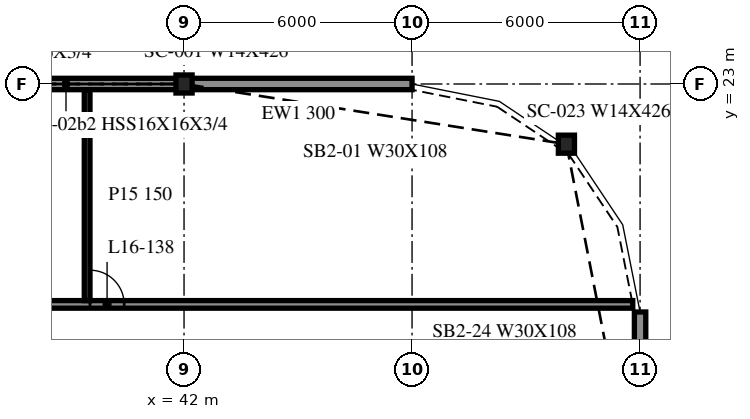
"""IFC4 building model, lengths in metres.
Left out: names, types, materials, properties, quantities, classifications, styles, units other than length and angle.
Written with IfcOpenShell. Run it as: python <this file> out.ifc"""

import sys

from ifc_helpers import new_model, si_unit, direction, frame, frame_2d, origin, origin_2d, place, context, subcontext, project, spatial, rectangle, i_section, extrude, element, fill, save


model = new_model("IFC4")
c1 = context("Model", 3, precision=1e-05, world=origin(), true_north=direction((0.0, 1.0)))
c2 = subcontext(c1, "Body", "Model", "MODEL_VIEW")
j1 = project(units=[si_unit("LENGTHUNIT", "METRE"), si_unit("PLANEANGLEUNIT", "RADIAN")], contexts=[c1])
p1 = place(None, origin())
s1 = spatial("IfcSite", under=j1, at=p1, CompositionType="ELEMENT")
p2 = place(p1, origin())
s2 = spatial("IfcBuilding", under=s1, at=p2, CompositionType="ELEMENT")
p3 = place(p2, frame((0.0, 0.0, 71.8)))
s3 = spatial("IfcBuildingStorey", under=s2, at=p3, CompositionType="ELEMENT", Elevation=71.8)
for number, where, z_axis, x_axis in (
    (1, (52.062, 21.416, -0.34), (0.0, 0.0, 1.0), (1.0, 0.0, 0.0)),
    (2, (42.0, 23.0, -0.34), (0.0, 0.0, 1.0), (1.0, 0.0, 0.0)),
):
    element("IfcColumn", number, at=place(p3, frame(where, z_axis=z_axis, x_axis=x_axis)), inside=s3, PredefinedType="COLUMN", context=c2, shape_type="SweptSolid", body=[
        extrude(i_section(OverallWidth=0.424, OverallDepth=0.475, WebThickness=0.048, FlangeThickness=0.077, at=origin_2d()), origin(), (0.0, 0.0, 1.0), 4.3),
    ])
p4 = place(p3, frame((48.0, 23.0, 0.0), z_axis=(0.0, 0.0, 1.0), x_axis=(-1.0, 0.0, 0.0)))
e3 = element("IfcWall", 3, at=p4, inside=s3, PredefinedType="NOTDEFINED", context=c2, shape_type="SweptSolid", body=[
    extrude(rectangle(XDim=5.976, YDim=0.3, at=frame_2d((2.988, 0.0))), origin(), (0.0, 0.0, 1.0), 3.203),
])
p5 = place(p3, frame((41.976, 23.0, 0.0), z_axis=(0.0, 0.0, 1.0), x_axis=(-1.0, 0.0, 0.0)))
e4 = element("IfcWall", 4, at=p5, inside=s3, PredefinedType="NOTDEFINED", context=c2, shape_type="SweptSolid", body=[
    extrude(rectangle(XDim=11.952, YDim=0.3, at=frame_2d((5.976, 0.0))), origin(), (0.0, 0.0, 1.0), 3.203),
])
p6 = place(p3, frame((54.0, 11.738, 0.0), z_axis=(0.0, 0.0, 1.0), x_axis=(0.0, 1.0, 0.0)))
e5 = element("IfcWall", 5, at=p6, inside=s3, PredefinedType="NOTDEFINED", context=c2, shape_type="SweptSolid", body=[
    extrude(rectangle(XDim=5.262, YDim=0.3, at=frame_2d((2.631, 0.0))), origin(), (0.0, 0.0, 1.0), 3.203),
])
p7 = place(p3, frame((-41.975, 17.2, 0.0), z_axis=(0.0, 0.0, 1.0), x_axis=(1.0, 0.0, 0.0)))
e6 = element("IfcWall", 6, at=p7, inside=s3, PredefinedType="PARTITIONING", context=c2, shape_type="SweptSolid", body=[
    extrude(rectangle(XDim=95.782, YDim=0.2, at=frame_2d((47.891, 0.0))), origin(), (0.0, 0.0, 1.0), 3.96),
])
p8 = place(p7, frame((13.7, 0.0, 0.0)))
e7 = element("IfcOpeningElement", 7, at=p8, cuts=e6, PredefinedType="OPENING", context=c2, shape_type="SweptSolid", body=[
    extrude(rectangle(XDim=0.9, YDim=2.1, at=frame_2d((0.45, 1.05))), frame((0.0, 0.11, 0.0), z_axis=(0.0, -1.0, 0.0), x_axis=(1.0, 0.0, 0.0)), (0.0, 0.0, 1.0), 0.22),
])
p9 = place(p7, frame((19.7, 0.0, 0.0)))
e8 = element("IfcOpeningElement", 8, at=p9, cuts=e6, PredefinedType="OPENING", context=c2, shape_type="SweptSolid", body=[
    extrude(rectangle(XDim=0.9, YDim=2.1, at=frame_2d((0.45, 1.05))), frame((0.0, 0.11, 0.0), z_axis=(0.0, -1.0, 0.0), x_axis=(1.0, 0.0, 0.0)), (0.0, 0.0, 1.0), 0.22),
])
p10 = place(p7, frame((23.1, 0.0, 0.0)))
e9 = element("IfcOpeningElement", 9, at=p10, cuts=e6, PredefinedType="OPENING", context=c2, shape_type="SweptSolid", body=[
    extrude(rectangle(XDim=0.9, YDim=2.1, at=frame_2d((0.45, 1.05))), frame((0.0, 0.11, 0.0), z_axis=(0.0, -1.0, 0.0), x_axis=(1.0, 0.0, 0.0)), (0.0, 0.0, 1.0), 0.22),
])
p11 = place(p7, frame((25.7, 0.0, 0.0)))
e10 = element("IfcOpeningElement", 10, at=p11, cuts=e6, PredefinedType="OPENING", context=c2, shape_type="SweptSolid", body=[
    extrude(rectangle(XDim=0.9, YDim=2.1, at=frame_2d((0.45, 1.05))), frame((0.0, 0.11, 0.0), z_axis=(0.0, -1.0, 0.0), x_axis=(1.0, 0.0, 0.0)), (0.0, 0.0, 1.0), 0.22),
])
p12 = place(p7, frame((40.7, 0.0, 0.0)))
e11 = element("IfcOpeningElement", 11, at=p12, cuts=e6, PredefinedType="OPENING", context=c2, shape_type="SweptSolid", body=[
    extrude(rectangle(XDim=0.9, YDim=2.1, at=frame_2d((0.45, 1.05))), frame((0.0, 0.11, 0.0), z_axis=(0.0, -1.0, 0.0), x_axis=(1.0, 0.0, 0.0)), (0.0, 0.0, 1.0), 0.22),
])
p13 = place(p7, frame((46.7, 0.0, 0.0)))
e12 = element("IfcOpeningElement", 12, at=p13, cuts=e6, PredefinedType="OPENING", context=c2, shape_type="SweptSolid", body=[
    extrude(rectangle(XDim=0.9, YDim=2.1, at=frame_2d((0.45, 1.05))), frame((0.0, 0.11, 0.0), z_axis=(0.0, -1.0, 0.0), x_axis=(1.0, 0.0, 0.0)), (0.0, 0.0, 1.0), 0.22),
])
p14 = place(p7, frame((48.1, 0.0, 0.0)))
e13 = element("IfcOpeningElement", 13, at=p14, cuts=e6, PredefinedType="OPENING", context=c2, shape_type="SweptSolid", body=[
    extrude(rectangle(XDim=0.9, YDim=2.1, at=frame_2d((0.45, 1.05))), frame((0.0, 0.11, 0.0), z_axis=(0.0, -1.0, 0.0), x_axis=(1.0, 0.0, 0.0)), (0.0, 0.0, 1.0), 0.22),
])
p15 = place(p7, frame((51.5, 0.0, 0.0)))
e14 = element("IfcOpeningElement", 14, at=p15, cuts=e6, PredefinedType="OPENING", context=c2, shape_type="SweptSolid", body=[
    extrude(rectangle(XDim=0.9, YDim=2.1, at=frame_2d((0.45, 1.05))), frame((0.0, 0.11, 0.0), z_axis=(0.0, -1.0, 0.0), x_axis=(1.0, 0.0, 0.0)), (0.0, 0.0, 1.0), 0.22),
])
p16 = place(p7, frame((54.1, 0.0, 0.0)))
e15 = element("IfcOpeningElement", 15, at=p16, cuts=e6, PredefinedType="OPENING", context=c2, shape_type="SweptSolid", body=[
    extrude(rectangle(XDim=0.9, YDim=2.1, at=frame_2d((0.45, 1.05))), frame((0.0, 0.11, 0.0), z_axis=(0.0, -1.0, 0.0), x_axis=(1.0, 0.0, 0.0)), (0.0, 0.0, 1.0), 0.22),
])
p17 = place(p7, frame((69.1, 0.0, 0.0)))
e16 = element("IfcOpeningElement", 16, at=p17, cuts=e6, PredefinedType="OPENING", context=c2, shape_type="SweptSolid", body=[
    extrude(rectangle(XDim=0.9, YDim=2.1, at=frame_2d((0.45, 1.05))), frame((0.0, 0.11, 0.0), z_axis=(0.0, -1.0, 0.0), x_axis=(1.0, 0.0, 0.0)), (0.0, 0.0, 1.0), 0.22),
])
p18 = place(p7, frame((75.1, 0.0, 0.0)))
e17 = element("IfcOpeningElement", 17, at=p18, cuts=e6, PredefinedType="OPENING", context=c2, shape_type="SweptSolid", body=[
    extrude(rectangle(XDim=0.9, YDim=2.1, at=frame_2d((0.45, 1.05))), frame((0.0, 0.11, 0.0), z_axis=(0.0, -1.0, 0.0), x_axis=(1.0, 0.0, 0.0)), (0.0, 0.0, 1.0), 0.22),
])
p19 = place(p7, frame((78.1, 0.0, 0.0)))
e18 = element("IfcOpeningElement", 18, at=p19, cuts=e6, PredefinedType="OPENING", context=c2, shape_type="SweptSolid", body=[
    extrude(rectangle(XDim=0.9, YDim=2.1, at=frame_2d((0.45, 1.05))), frame((0.0, 0.11, 0.0), z_axis=(0.0, -1.0, 0.0), x_axis=(1.0, 0.0, 0.0)), (0.0, 0.0, 1.0), 0.22),
])
p20 = place(p7, frame((81.5, 0.0, 0.0)))
e19 = element("IfcOpeningElement", 19, at=p20, cuts=e6, PredefinedType="OPENING", context=c2, shape_type="SweptSolid", body=[
    extrude(rectangle(XDim=0.9, YDim=2.1, at=frame_2d((0.45, 1.05))), frame((0.0, 0.11, 0.0), z_axis=(0.0, -1.0, 0.0), x_axis=(1.0, 0.0, 0.0)), (0.0, 0.0, 1.0), 0.22),
])
p21 = place(p3, frame((39.45, 17.3, 0.0), z_axis=(0.0, 0.0, 1.0), x_axis=(0.0, 1.0, 0.0)))
e20 = element("IfcWall", 20, at=p21, inside=s3, PredefinedType="PARTITIONING", context=c2, shape_type="SweptSolid", body=[
    extrude(rectangle(XDim=5.55, YDim=0.15, at=frame_2d((2.775, 0.0))), origin(), (0.0, 0.0, 1.0), 3.96),
])
p22 = place(p20, origin())
e21 = element("IfcDoor", 21, at=p22, inside=s3, OperationType="SINGLE_SWING_RIGHT", PredefinedType="DOOR", context=c2, shape_type="SweptSolid", body=[
    extrude(rectangle(XDim=0.9, YDim=2.1, at=frame_2d((0.45, 1.05))), frame((0.0, 0.025, 0.0), z_axis=(0.0, -1.0, 0.0), x_axis=(1.0, 0.0, 0.0)), (0.0, 0.0, 1.0), 0.05),
])
fill(e19, e21)
save(model, sys.argv[1])
